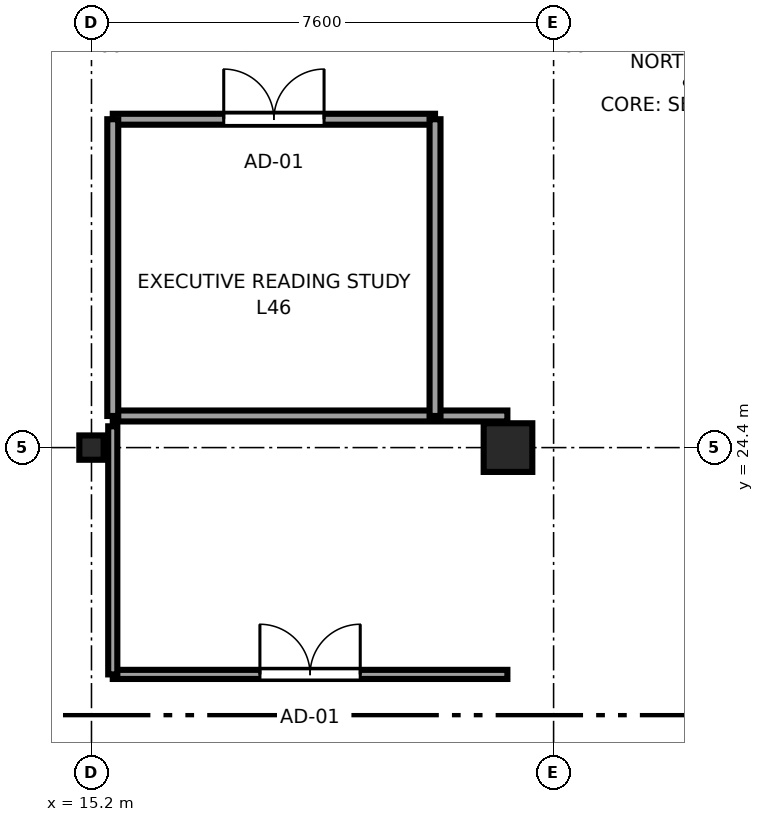
"""IFC4 building model, lengths in metres.
Left out: names, types, materials, properties, quantities, classifications, styles, units other than length and angle.
Written with IfcOpenShell. Run it as: python <this file> out.ifc"""

import sys

from ifc_helpers import new_model, si_unit, direction, frame, frame_2d, origin, origin_2d, place, context, subcontext, project, spatial, rectangle, i_section, extrude, source, transform, mapped, element, fill, save


model = new_model("IFC4")
c1 = context("Model", 3, precision=1e-05, world=origin(), true_north=direction((0.0, 1.0)))
c2 = subcontext(c1, "Body", "Model", "MODEL_VIEW")
j1 = project(units=[si_unit("LENGTHUNIT", "METRE"), si_unit("PLANEANGLEUNIT", "RADIAN")], contexts=[c1])
p1 = place(None, origin())
s1 = spatial("IfcSite", under=j1, at=p1, CompositionType="ELEMENT")
p2 = place(p1, origin())
s2 = spatial("IfcBuilding", under=s1, at=p2, CompositionType="ELEMENT")
p3 = place(p2, frame((0.0, 0.0, 175.45)))
s3 = spatial("IfcBuildingStorey", under=s2, at=p3, CompositionType="ELEMENT", Elevation=175.45)
m1 = source(origin(), c2, "Body", "SweptSolid", [
    extrude(i_section(OverallWidth=0.4, OverallDepth=0.4, WebThickness=0.02, FlangeThickness=0.035, at=origin_2d()), origin(), (0.0, 0.0, 1.0), 3.55),
])
p4 = place(p3, frame((15.2, 24.4, 0.0), z_axis=(0.0, 0.0, 1.0), x_axis=(1.0, 0.0, 0.0)))
e1 = element("IfcColumn", 1, at=p4, inside=s3, PredefinedType="COLUMN", context=c2, shape_type="MappedRepresentation", body=[
    mapped(m1, transform((0.0, 0.0, 0.0), x_axis=(1.0, 0.0, 0.0), y_axis=(0.0, 1.0, 0.0), z_axis=(0.0, 0.0, 1.0), scale=1.0)),
])
m2 = source(origin(), c2, "Body", "SweptSolid", [
    extrude(rectangle(XDim=0.8, YDim=0.8, at=origin_2d()), origin(), (0.0, 0.0, 1.0), 3.55),
])
p5 = place(p3, frame((22.05, 24.4, 0.0), z_axis=(0.0, 0.0, 1.0), x_axis=(1.0, 0.0, 0.0)))
e2 = element("IfcColumn", 2, at=p5, inside=s3, PredefinedType="COLUMN", context=c2, shape_type="MappedRepresentation", body=[
    mapped(m2, transform((0.0, 0.0, 0.0), x_axis=(1.0, 0.0, 0.0), y_axis=(0.0, 1.0, 0.0), z_axis=(0.0, 0.0, 1.0), scale=1.0)),
])
p6 = place(p3, frame((15.55, 24.92, 0.0), z_axis=(0.0, 0.0, 1.0), x_axis=(1.0, 0.0, 0.0)))
e3 = element("IfcWall", 3, at=p6, inside=s3, PredefinedType="PARTITIONING", context=c2, shape_type="SweptSolid", body=[
    extrude(rectangle(XDim=6.49, YDim=0.18, at=frame_2d((3.245, 0.0))), origin(), (0.0, 0.0, 1.0), 3.37),
])
p7 = place(p3, frame((15.55, 29.8, 0.0), z_axis=(0.0, 0.0, 1.0), x_axis=(1.0, 0.0, 0.0)))
e4 = element("IfcWall", 4, at=p7, inside=s3, PredefinedType="PARTITIONING", context=c2, shape_type="SweptSolid", body=[
    extrude(rectangle(XDim=5.3, YDim=0.18, at=frame_2d((2.65, 0.0))), origin(), (0.0, 0.0, 1.0), 3.37),
])
p8 = place(p7, frame((1.825, 0.0, 0.0)))
e5 = element("IfcOpeningElement", 5, at=p8, cuts=e4, PredefinedType="OPENING", context=c2, shape_type="SweptSolid", body=[
    extrude(rectangle(XDim=1.65, YDim=2.15, at=frame_2d((0.825, 1.075))), frame((0.0, 0.1, 0.0), z_axis=(0.0, -1.0, 0.0), x_axis=(1.0, 0.0, 0.0)), (0.0, 0.0, 1.0), 0.2),
])
for number, where, z_axis, x_axis in (
    (6, (15.55, 24.92, 0.0), (0.0, 0.0, 1.0), (0.0, 1.0, 0.0)),
    (7, (20.85, 24.92, 0.0), (0.0, 0.0, 1.0), (0.0, 1.0, 0.0)),
):
    element("IfcWall", number, at=place(p3, frame(where, z_axis=z_axis, x_axis=x_axis)), inside=s3, PredefinedType="PARTITIONING", context=c2, shape_type="SweptSolid", body=[
        extrude(rectangle(XDim=4.88, YDim=0.18, at=frame_2d((2.44, 0.0))), origin(), (0.0, 0.0, 1.0), 3.37),
    ])
p9 = place(p3, frame((15.55, 20.67, 0.0), z_axis=(0.0, 0.0, 1.0), x_axis=(1.0, 0.0, 0.0)))
e8 = element("IfcWall", 8, at=p9, inside=s3, PredefinedType="PARTITIONING", context=c2, shape_type="SweptSolid", body=[
    extrude(rectangle(XDim=6.49, YDim=0.15, at=frame_2d((3.245, 0.0))), origin(), (0.0, 0.0, 1.0), 3.37),
])
p10 = place(p9, frame((2.42, 0.0, 0.0)))
e9 = element("IfcOpeningElement", 9, at=p10, cuts=e8, PredefinedType="OPENING", context=c2, shape_type="SweptSolid", body=[
    extrude(rectangle(XDim=1.65, YDim=2.15, at=frame_2d((0.825, 1.075))), frame((0.0, 0.085, 0.0), z_axis=(0.0, -1.0, 0.0), x_axis=(1.0, 0.0, 0.0)), (0.0, 0.0, 1.0), 0.17),
])
p11 = place(p3, frame((15.55, 20.67, 0.0), z_axis=(0.0, 0.0, 1.0), x_axis=(0.0, 1.0, 0.0)))
e10 = element("IfcWall", 10, at=p11, inside=s3, PredefinedType="PARTITIONING", context=c2, shape_type="SweptSolid", body=[
    extrude(rectangle(XDim=4.08, YDim=0.15, at=frame_2d((2.04, 0.0))), origin(), (0.0, 0.0, 1.0), 3.37),
])
m3 = source(origin(), c2, "Body", "SweptSolid", [
    extrude(rectangle(XDim=1.65, YDim=2.15, at=frame_2d((0.825, 1.075))), frame((0.0, 0.025, 0.0), z_axis=(0.0, -1.0, 0.0), x_axis=(1.0, 0.0, 0.0)), (0.0, 0.0, 1.0), 0.05),
])
p12 = place(p8, origin())
e11 = element("IfcDoor", 11, at=p12, inside=s3, OperationType="DOUBLE_DOOR_SINGLE_SWING", PredefinedType="DOOR", context=c2, shape_type="MappedRepresentation", body=[
    mapped(m3, transform((0.0, 0.0, 0.0), x_axis=(1.0, 0.0, 0.0), y_axis=(0.0, 1.0, 0.0), z_axis=(0.0, 0.0, 1.0), scale=1.0)),
])
fill(e5, e11)
p13 = place(p10, origin())
e12 = element("IfcDoor", 12, at=p13, inside=s3, OperationType="DOUBLE_DOOR_SINGLE_SWING", PredefinedType="DOOR", context=c2, shape_type="MappedRepresentation", body=[
    mapped(m3, transform((0.0, 0.0, 0.0), x_axis=(1.0, 0.0, 0.0), y_axis=(0.0, 1.0, 0.0), z_axis=(0.0, 0.0, 1.0), scale=1.0)),
])
fill(e9, e12)
save(model, sys.argv[1])
